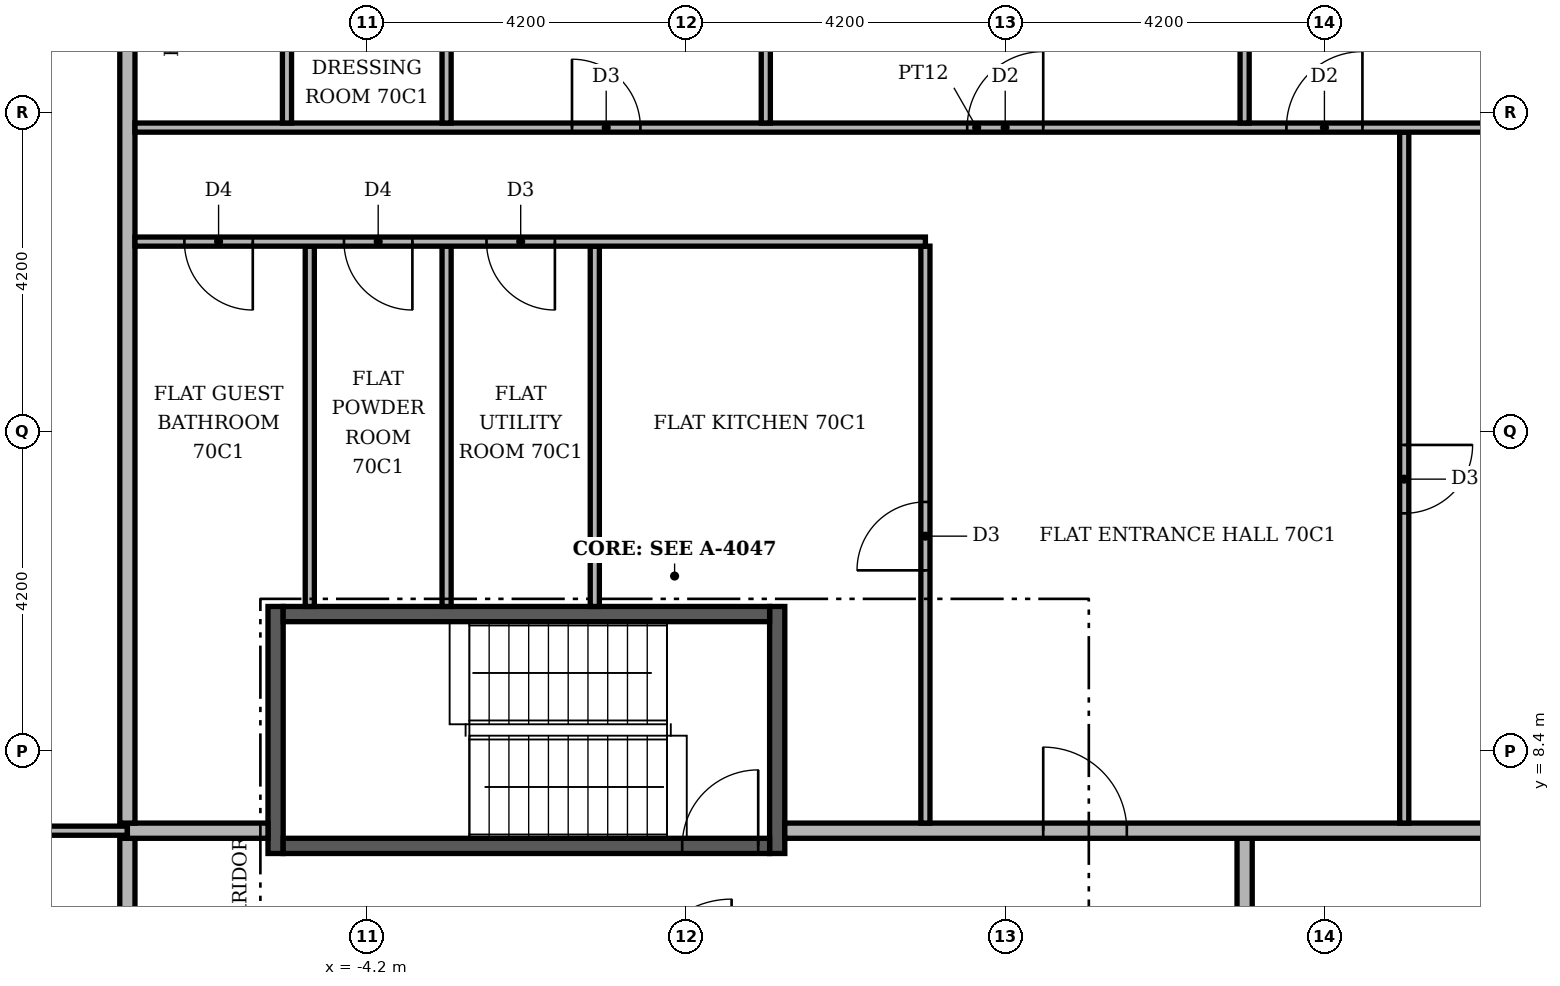
"""IFC4 building model, lengths in metres.
Left out: names, types, materials, properties, quantities, classifications, styles, units other than length and angle.
Written with IfcOpenShell. Run it as: python <this file> out.ifc"""

import sys

from ifc_helpers import new_model, si_unit, direction, frame, frame_2d, origin, place, context, subcontext, project, spatial, rectangle, extrude, element, fill, save


model = new_model("IFC4")
c1 = context("Model", 3, precision=1e-05, world=origin(), true_north=direction((0.0, 1.0)))
c2 = subcontext(c1, "Body", "Model", "MODEL_VIEW")
j1 = project(units=[si_unit("LENGTHUNIT", "METRE"), si_unit("PLANEANGLEUNIT", "RADIAN")], contexts=[c1])
p1 = place(None, origin())
s1 = spatial("IfcSite", under=j1, at=p1, CompositionType="ELEMENT")
p2 = place(p1, origin())
s2 = spatial("IfcBuilding", under=s1, at=p2, CompositionType="ELEMENT")
p3 = place(p2, frame((0.0, 0.0, 292.8)))
s3 = spatial("IfcBuildingStorey", under=s2, at=p3, CompositionType="ELEMENT", Elevation=292.8)
for number, where, z_axis, x_axis in (
    (1, (-5.4, 7.05, 0.0), (0.0, 0.0, 1.0), (0.0, 1.0, 0.0)),
    (2, (1.2, 7.05, 0.0), (0.0, 0.0, 1.0), (0.0, 1.0, 0.0)),
):
    element("IfcWall", number, at=place(p3, frame(where, z_axis=z_axis, x_axis=x_axis)), inside=s3, PredefinedType="SHEAR", context=c2, shape_type="SweptSolid", body=[
        extrude(rectangle(XDim=3.25, YDim=0.2, at=frame_2d((1.625, 0.0))), origin(), (0.0, 0.0, 1.0), 3.55),
    ])
p4 = place(p3, frame((-5.3, 7.15, 0.0), z_axis=(0.0, 0.0, 1.0), x_axis=(1.0, 0.0, 0.0)))
e3 = element("IfcWall", 3, at=p4, inside=s3, PredefinedType="SHEAR", context=c2, shape_type="SweptSolid", body=[
    extrude(rectangle(XDim=6.4, YDim=0.2, at=frame_2d((3.2, 0.0))), origin(), (0.0, 0.0, 1.0), 3.55),
])
p5 = place(p4, frame((5.25, 0.0, 0.0)))
e4 = element("IfcOpeningElement", 4, at=p5, cuts=e3, PredefinedType="OPENING", context=c2, shape_type="SweptSolid", body=[
    extrude(rectangle(XDim=1.0, YDim=2.1, at=frame_2d((0.5, 1.05))), frame((0.0, 0.11, 0.0), z_axis=(0.0, -1.0, 0.0), x_axis=(1.0, 0.0, 0.0)), (0.0, 0.0, 1.0), 0.22),
])
p6 = place(p3, frame((-5.3, 10.2, 0.0), z_axis=(0.0, 0.0, 1.0), x_axis=(1.0, 0.0, 0.0)))
e5 = element("IfcWall", 5, at=p6, inside=s3, PredefinedType="SHEAR", context=c2, shape_type="SweptSolid", body=[
    extrude(rectangle(XDim=6.4, YDim=0.2, at=frame_2d((3.2, 0.0))), origin(), (0.0, 0.0, 1.0), 3.55),
])
p7 = place(p3, frame((-7.35, -7.25, 0.0), z_axis=(0.0, 0.0, 1.0), x_axis=(0.0, 1.0, 0.0)))
e6 = element("IfcWall", 6, at=p7, inside=s3, PredefinedType="PARTITIONING", context=c2, shape_type="SweptSolid", body=[
    extrude(rectangle(XDim=14.5, YDim=0.2, at=frame_2d((7.25, 0.0))), origin(), (0.0, 0.0, 1.0), 3.55),
])
p8 = place(p7, frame((10.9, 0.0, 0.0)))
e7 = element("IfcOpeningElement", 7, at=p8, cuts=e6, PredefinedType="OPENING", context=c2, shape_type="SweptSolid", body=[
    extrude(rectangle(XDim=1.1, YDim=2.4, at=frame_2d((0.55, 1.2))), frame((0.0, 0.11, 0.0), z_axis=(0.0, -1.0, 0.0), x_axis=(1.0, 0.0, 0.0)), (0.0, 0.0, 1.0), 0.22),
])
p9 = place(p3, frame((7.35, -7.25, 0.0), z_axis=(0.0, 0.0, 1.0), x_axis=(0.0, 1.0, 0.0)))
e8 = element("IfcWall", 8, at=p9, inside=s3, PredefinedType="PARTITIONING", context=c2, shape_type="SweptSolid", body=[
    extrude(rectangle(XDim=14.5, YDim=0.2, at=frame_2d((7.25, 0.0))), origin(), (0.0, 0.0, 1.0), 3.55),
])
p10 = place(p9, frame((2.5, 0.0, 0.0)))
e9 = element("IfcOpeningElement", 9, at=p10, cuts=e8, PredefinedType="OPENING", context=c2, shape_type="SweptSolid", body=[
    extrude(rectangle(XDim=1.1, YDim=2.4, at=frame_2d((0.55, 1.2))), frame((0.0, 0.11, 0.0), z_axis=(0.0, -1.0, 0.0), x_axis=(1.0, 0.0, 0.0)), (0.0, 0.0, 1.0), 0.22),
])
p11 = place(p3, frame((-16.0, 7.35, 0.0), z_axis=(0.0, 0.0, 1.0), x_axis=(1.0, 0.0, 0.0)))
e10 = element("IfcWall", 10, at=p11, inside=s3, PredefinedType="PARTITIONING", context=c2, shape_type="SweptSolid", body=[
    extrude(rectangle(XDim=8.65, YDim=0.12, at=frame_2d((4.325, 0.0))), origin(), (0.0, 0.0, 1.0), 3.55),
])
p12 = place(p11, frame((3.875, 0.0, 0.0)))
e11 = element("IfcOpeningElement", 11, at=p12, cuts=e10, PredefinedType="OPENING", context=c2, shape_type="SweptSolid", body=[
    extrude(rectangle(XDim=0.9, YDim=2.1, at=frame_2d((0.45, 1.05))), frame((0.0, 0.07, 0.0), z_axis=(0.0, -1.0, 0.0), x_axis=(1.0, 0.0, 0.0)), (0.0, 0.0, 1.0), 0.14),
])
p13 = place(p3, frame((-7.35, 7.35, 0.0), z_axis=(0.0, 0.0, 1.0), x_axis=(1.0, 0.0, 0.0)))
e12 = element("IfcWall", 12, at=p13, inside=s3, PredefinedType="PARTITIONING", context=c2, shape_type="SweptSolid", body=[
    extrude(rectangle(XDim=1.85, YDim=0.2, at=frame_2d((0.925, 0.0))), origin(), (0.0, 0.0, 1.0), 3.55),
])
p14 = place(p3, frame((1.3, 7.35, 0.0), z_axis=(0.0, 0.0, 1.0), x_axis=(1.0, 0.0, 0.0)))
e13 = element("IfcWall", 13, at=p14, inside=s3, PredefinedType="PARTITIONING", context=c2, shape_type="SweptSolid", body=[
    extrude(rectangle(XDim=20.0, YDim=0.2, at=frame_2d((10.0, 0.0))), origin(), (0.0, 0.0, 1.0), 3.55),
])
p15 = place(p14, frame((3.4, 0.0, 0.0)))
e14 = element("IfcOpeningElement", 14, at=p15, cuts=e13, PredefinedType="OPENING", context=c2, shape_type="SweptSolid", body=[
    extrude(rectangle(XDim=1.1, YDim=2.4, at=frame_2d((0.55, 1.2))), frame((0.0, 0.11, 0.0), z_axis=(0.0, -1.0, 0.0), x_axis=(1.0, 0.0, 0.0)), (0.0, 0.0, 1.0), 0.22),
])
p16 = place(p3, frame((-7.35, 7.45, 0.0), z_axis=(0.0, 0.0, 1.0), x_axis=(0.0, 1.0, 0.0)))
e15 = element("IfcWall", 15, at=p16, inside=s3, PredefinedType="PARTITIONING", context=c2, shape_type="SweptSolid", body=[
    extrude(rectangle(XDim=13.85, YDim=0.2, at=frame_2d((6.925, 0.0))), origin(), (0.0, 0.0, 1.0), 3.55),
])
p17 = place(p3, frame((3.15, 7.45, 0.0), z_axis=(0.0, 0.0, 1.0), x_axis=(0.0, 1.0, 0.0)))
e16 = element("IfcWall", 16, at=p17, inside=s3, PredefinedType="PARTITIONING", context=c2, shape_type="SweptSolid", body=[
    extrude(rectangle(XDim=7.59, YDim=0.12, at=frame_2d((3.795, 0.0))), origin(), (0.0, 0.0, 1.0), 3.55),
])
p18 = place(p17, frame((3.325, 0.0, 0.0)))
e17 = element("IfcOpeningElement", 17, at=p18, cuts=e16, PredefinedType="OPENING", context=c2, shape_type="SweptSolid", body=[
    extrude(rectangle(XDim=0.9, YDim=2.1, at=frame_2d((0.45, 1.05))), frame((0.0, 0.07, 0.0), z_axis=(0.0, -1.0, 0.0), x_axis=(1.0, 0.0, 0.0)), (0.0, 0.0, 1.0), 0.14),
])
p19 = place(p3, frame((9.45, 7.45, 0.0), z_axis=(0.0, 0.0, 1.0), x_axis=(0.0, 1.0, 0.0)))
e18 = element("IfcWall", 18, at=p19, inside=s3, PredefinedType="PARTITIONING", context=c2, shape_type="SweptSolid", body=[
    extrude(rectangle(XDim=9.09, YDim=0.12, at=frame_2d((4.545, 0.0))), origin(), (0.0, 0.0, 1.0), 3.55),
])
p20 = place(p19, frame((4.075, 0.0, 0.0)))
e19 = element("IfcOpeningElement", 19, at=p20, cuts=e18, PredefinedType="OPENING", context=c2, shape_type="SweptSolid", body=[
    extrude(rectangle(XDim=0.9, YDim=2.1, at=frame_2d((0.45, 1.05))), frame((0.0, 0.07, 0.0), z_axis=(0.0, -1.0, 0.0), x_axis=(1.0, 0.0, 0.0)), (0.0, 0.0, 1.0), 0.14),
])
for number, where, z_axis, x_axis in (
    (20, (-4.95, 10.3, 0.0), (0.0, 0.0, 1.0), (0.0, 1.0, 0.0)),
    (21, (-3.15, 10.3, 0.0), (0.0, 0.0, 1.0), (0.0, 1.0, 0.0)),
    (22, (-1.2, 10.3, 0.0), (0.0, 0.0, 1.0), (0.0, 1.0, 0.0)),
):
    element("IfcWall", number, at=place(p3, frame(where, z_axis=z_axis, x_axis=x_axis)), inside=s3, PredefinedType="PARTITIONING", context=c2, shape_type="SweptSolid", body=[
        extrude(rectangle(XDim=4.74, YDim=0.12, at=frame_2d((2.37, 0.0))), origin(), (0.0, 0.0, 1.0), 3.55),
    ])
p21 = place(p3, frame((-7.25, 15.1, 0.0), z_axis=(0.0, 0.0, 1.0), x_axis=(1.0, 0.0, 0.0)))
e23 = element("IfcWall", 23, at=p21, inside=s3, PredefinedType="PARTITIONING", context=c2, shape_type="SweptSolid", body=[
    extrude(rectangle(XDim=10.4, YDim=0.12, at=frame_2d((5.2, 0.0))), origin(), (0.0, 0.0, 1.0), 3.55),
])
p22 = place(p21, frame((4.625, 0.0, 0.0)))
e24 = element("IfcOpeningElement", 24, at=p22, cuts=e23, PredefinedType="OPENING", context=c2, shape_type="SweptSolid", body=[
    extrude(rectangle(XDim=0.9, YDim=2.1, at=frame_2d((0.45, 1.05))), frame((0.0, 0.07, 0.0), z_axis=(0.0, -1.0, 0.0), x_axis=(1.0, 0.0, 0.0)), (0.0, 0.0, 1.0), 0.14),
])
p23 = place(p21, frame((2.75, 0.0, 0.0)))
e25 = element("IfcOpeningElement", 25, at=p23, cuts=e23, PredefinedType="OPENING", context=c2, shape_type="SweptSolid", body=[
    extrude(rectangle(XDim=0.9, YDim=2.1, at=frame_2d((0.45, 1.05))), frame((0.0, 0.07, 0.0), z_axis=(0.0, -1.0, 0.0), x_axis=(1.0, 0.0, 0.0)), (0.0, 0.0, 1.0), 0.14),
])
p24 = place(p21, frame((0.65, 0.0, 0.0)))
e26 = element("IfcOpeningElement", 26, at=p24, cuts=e23, PredefinedType="OPENING", context=c2, shape_type="SweptSolid", body=[
    extrude(rectangle(XDim=0.9, YDim=2.1, at=frame_2d((0.45, 1.05))), frame((0.0, 0.07, 0.0), z_axis=(0.0, -1.0, 0.0), x_axis=(1.0, 0.0, 0.0)), (0.0, 0.0, 1.0), 0.14),
])
p25 = place(p3, frame((-7.25, 16.6, 0.0), z_axis=(0.0, 0.0, 1.0), x_axis=(1.0, 0.0, 0.0)))
e27 = element("IfcWall", 27, at=p25, inside=s3, PredefinedType="PARTITIONING", context=c2, shape_type="SweptSolid", body=[
    extrude(rectangle(XDim=22.149, YDim=0.12, at=frame_2d((11.074, 0.0))), origin(), (0.0, 0.0, 1.0), 3.55),
])
p26 = place(p25, frame((15.15, 0.0, 0.0)))
e28 = element("IfcOpeningElement", 28, at=p26, cuts=e27, PredefinedType="OPENING", context=c2, shape_type="SweptSolid", body=[
    extrude(rectangle(XDim=1.0, YDim=2.1, at=frame_2d((0.5, 1.05))), frame((0.0, 0.07, 0.0), z_axis=(0.0, -1.0, 0.0), x_axis=(1.0, 0.0, 0.0)), (0.0, 0.0, 1.0), 0.14),
])
p27 = place(p25, frame((10.95, 0.0, 0.0)))
e29 = element("IfcOpeningElement", 29, at=p27, cuts=e27, PredefinedType="OPENING", context=c2, shape_type="SweptSolid", body=[
    extrude(rectangle(XDim=1.0, YDim=2.1, at=frame_2d((0.5, 1.05))), frame((0.0, 0.07, 0.0), z_axis=(0.0, -1.0, 0.0), x_axis=(1.0, 0.0, 0.0)), (0.0, 0.0, 1.0), 0.14),
])
p28 = place(p25, frame((5.75, 0.0, 0.0)))
e30 = element("IfcOpeningElement", 30, at=p28, cuts=e27, PredefinedType="OPENING", context=c2, shape_type="SweptSolid", body=[
    extrude(rectangle(XDim=0.9, YDim=2.1, at=frame_2d((0.45, 1.05))), frame((0.0, 0.07, 0.0), z_axis=(0.0, -1.0, 0.0), x_axis=(1.0, 0.0, 0.0)), (0.0, 0.0, 1.0), 0.14),
])
p29 = place(p3, frame((-5.25, 16.66, 0.0), z_axis=(0.0, 0.0, 1.0), x_axis=(0.0, 1.0, 0.0)))
e31 = element("IfcWall", 31, at=p29, inside=s3, PredefinedType="PARTITIONING", context=c2, shape_type="SweptSolid", body=[
    extrude(rectangle(XDim=4.64, YDim=0.12, at=frame_2d((2.32, 0.0))), origin(), (0.0, 0.0, 1.0), 3.55),
])
p30 = place(p29, frame((1.99, 0.0, 0.0)))
e32 = element("IfcOpeningElement", 32, at=p30, cuts=e31, PredefinedType="OPENING", context=c2, shape_type="SweptSolid", body=[
    extrude(rectangle(XDim=0.9, YDim=2.1, at=frame_2d((0.45, 1.05))), frame((0.0, 0.07, 0.0), z_axis=(0.0, -1.0, 0.0), x_axis=(1.0, 0.0, 0.0)), (0.0, 0.0, 1.0), 0.14),
])
p31 = place(p3, frame((-3.15, 16.66, 0.0), z_axis=(0.0, 0.0, 1.0), x_axis=(0.0, 1.0, 0.0)))
e33 = element("IfcWall", 33, at=p31, inside=s3, PredefinedType="PARTITIONING", context=c2, shape_type="SweptSolid", body=[
    extrude(rectangle(XDim=4.64, YDim=0.12, at=frame_2d((2.32, 0.0))), origin(), (0.0, 0.0, 1.0), 3.55),
])
p32 = place(p31, frame((1.99, 0.0, 0.0)))
e34 = element("IfcOpeningElement", 34, at=p32, cuts=e33, PredefinedType="OPENING", context=c2, shape_type="SweptSolid", body=[
    extrude(rectangle(XDim=0.9, YDim=2.1, at=frame_2d((0.45, 1.05))), frame((0.0, 0.07, 0.0), z_axis=(0.0, -1.0, 0.0), x_axis=(1.0, 0.0, 0.0)), (0.0, 0.0, 1.0), 0.14),
])
for number, where, z_axis, x_axis in (
    (35, (1.05, 16.66, 0.0), (0.0, 0.0, 1.0), (0.0, 1.0, 0.0)),
    (36, (7.35, 16.66, 0.0), (0.0, 0.0, 1.0), (0.0, 1.0, 0.0)),
):
    element("IfcWall", number, at=place(p3, frame(where, z_axis=z_axis, x_axis=x_axis)), inside=s3, PredefinedType="PARTITIONING", context=c2, shape_type="SweptSolid", body=[
        extrude(rectangle(XDim=4.64, YDim=0.12, at=frame_2d((2.32, 0.0))), origin(), (0.0, 0.0, 1.0), 3.55),
    ])
p33 = place(p5, origin())
e37 = element("IfcDoor", 37, at=p33, inside=s3, OperationType="SINGLE_SWING_RIGHT", PredefinedType="DOOR", context=c2, shape_type="SweptSolid", body=[
    extrude(rectangle(XDim=1.0, YDim=2.1, at=frame_2d((0.5, 1.05))), frame((0.0, 0.025, 0.0), z_axis=(0.0, -1.0, 0.0), x_axis=(1.0, 0.0, 0.0)), (0.0, 0.0, 1.0), 0.05),
])
fill(e4, e37)
p34 = place(p15, origin())
e38 = element("IfcDoor", 38, at=p34, inside=s3, OperationType="SINGLE_SWING_LEFT", PredefinedType="DOOR", context=c2, shape_type="SweptSolid", body=[
    extrude(rectangle(XDim=1.1, YDim=2.4, at=frame_2d((0.55, 1.2))), frame((0.0, 0.025, 0.0), z_axis=(0.0, -1.0, 0.0), x_axis=(1.0, 0.0, 0.0)), (0.0, 0.0, 1.0), 0.05),
])
fill(e14, e38)
p35 = place(p20, frame((0.9, 0.0, 0.0), z_axis=(0.0, 0.0, 1.0), x_axis=(-1.0, 0.0, 0.0)))
e39 = element("IfcDoor", 39, at=p35, inside=s3, OperationType="SINGLE_SWING_RIGHT", PredefinedType="DOOR", context=c2, shape_type="SweptSolid", body=[
    extrude(rectangle(XDim=0.9, YDim=2.1, at=frame_2d((0.45, 1.05))), frame((0.0, 0.025, 0.0), z_axis=(0.0, -1.0, 0.0), x_axis=(1.0, 0.0, 0.0)), (0.0, 0.0, 1.0), 0.05),
])
fill(e19, e39)
p36 = place(p18, origin())
e40 = element("IfcDoor", 40, at=p36, inside=s3, OperationType="SINGLE_SWING_LEFT", PredefinedType="DOOR", context=c2, shape_type="SweptSolid", body=[
    extrude(rectangle(XDim=0.9, YDim=2.1, at=frame_2d((0.45, 1.05))), frame((0.0, 0.025, 0.0), z_axis=(0.0, -1.0, 0.0), x_axis=(1.0, 0.0, 0.0)), (0.0, 0.0, 1.0), 0.05),
])
fill(e17, e40)
p37 = place(p22, frame((0.9, 0.0, 0.0), z_axis=(0.0, 0.0, 1.0), x_axis=(-1.0, 0.0, 0.0)))
e41 = element("IfcDoor", 41, at=p37, inside=s3, OperationType="SINGLE_SWING_RIGHT", PredefinedType="DOOR", context=c2, shape_type="SweptSolid", body=[
    extrude(rectangle(XDim=0.9, YDim=2.1, at=frame_2d((0.45, 1.05))), frame((0.0, 0.025, 0.0), z_axis=(0.0, -1.0, 0.0), x_axis=(1.0, 0.0, 0.0)), (0.0, 0.0, 1.0), 0.05),
])
fill(e24, e41)
p38 = place(p23, frame((0.9, 0.0, 0.0), z_axis=(0.0, 0.0, 1.0), x_axis=(-1.0, 0.0, 0.0)))
e42 = element("IfcDoor", 42, at=p38, inside=s3, OperationType="SINGLE_SWING_RIGHT", PredefinedType="DOOR", context=c2, shape_type="SweptSolid", body=[
    extrude(rectangle(XDim=0.9, YDim=2.1, at=frame_2d((0.45, 1.05))), frame((0.0, 0.025, 0.0), z_axis=(0.0, -1.0, 0.0), x_axis=(1.0, 0.0, 0.0)), (0.0, 0.0, 1.0), 0.05),
])
fill(e25, e42)
p39 = place(p24, frame((0.9, 0.0, 0.0), z_axis=(0.0, 0.0, 1.0), x_axis=(-1.0, 0.0, 0.0)))
e43 = element("IfcDoor", 43, at=p39, inside=s3, OperationType="SINGLE_SWING_RIGHT", PredefinedType="DOOR", context=c2, shape_type="SweptSolid", body=[
    extrude(rectangle(XDim=0.9, YDim=2.1, at=frame_2d((0.45, 1.05))), frame((0.0, 0.025, 0.0), z_axis=(0.0, -1.0, 0.0), x_axis=(1.0, 0.0, 0.0)), (0.0, 0.0, 1.0), 0.05),
])
fill(e26, e43)
p40 = place(p26, origin())
e44 = element("IfcDoor", 44, at=p40, inside=s3, OperationType="SINGLE_SWING_RIGHT", PredefinedType="DOOR", context=c2, shape_type="SweptSolid", body=[
    extrude(rectangle(XDim=1.0, YDim=2.1, at=frame_2d((0.5, 1.05))), frame((0.0, 0.025, 0.0), z_axis=(0.0, -1.0, 0.0), x_axis=(1.0, 0.0, 0.0)), (0.0, 0.0, 1.0), 0.05),
])
fill(e28, e44)
p41 = place(p27, origin())
e45 = element("IfcDoor", 45, at=p41, inside=s3, OperationType="SINGLE_SWING_RIGHT", PredefinedType="DOOR", context=c2, shape_type="SweptSolid", body=[
    extrude(rectangle(XDim=1.0, YDim=2.1, at=frame_2d((0.5, 1.05))), frame((0.0, 0.025, 0.0), z_axis=(0.0, -1.0, 0.0), x_axis=(1.0, 0.0, 0.0)), (0.0, 0.0, 1.0), 0.05),
])
fill(e29, e45)
p42 = place(p28, origin())
e46 = element("IfcDoor", 46, at=p42, inside=s3, OperationType="SINGLE_SWING_LEFT", PredefinedType="DOOR", context=c2, shape_type="SweptSolid", body=[
    extrude(rectangle(XDim=0.9, YDim=2.1, at=frame_2d((0.45, 1.05))), frame((0.0, 0.025, 0.0), z_axis=(0.0, -1.0, 0.0), x_axis=(1.0, 0.0, 0.0)), (0.0, 0.0, 1.0), 0.05),
])
fill(e30, e46)
save(model, sys.argv[1])
